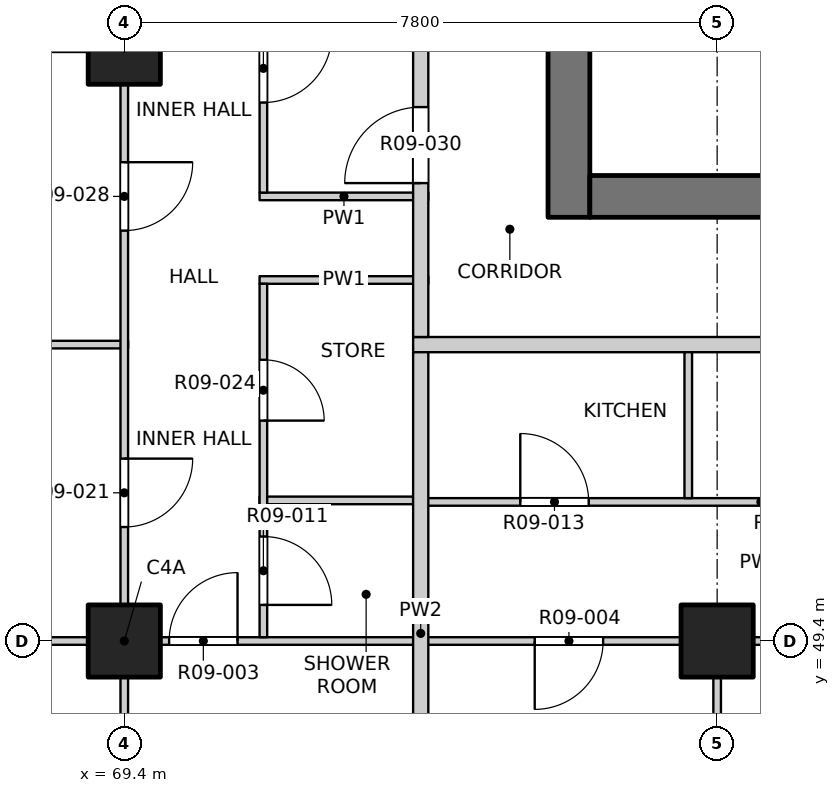
"""IFC4 building model, lengths in metres.
Left out: names, types, materials, properties, quantities, classifications, styles, units other than length and angle.
Written with IfcOpenShell. Run it as: python <this file> out.ifc"""

import sys

from ifc_helpers import new_model, si_unit, direction, frame, frame_2d, origin, origin_2d, place, context, subcontext, project, spatial, rectangle, extrude, element, fill, save


model = new_model("IFC4")
c1 = context("Model", 3, precision=1e-05, world=origin(), true_north=direction((0.0, 1.0)))
c2 = subcontext(c1, "Body", "Model", "MODEL_VIEW")
j1 = project(units=[si_unit("LENGTHUNIT", "METRE"), si_unit("PLANEANGLEUNIT", "RADIAN")], contexts=[c1])
p1 = place(None, origin())
s1 = spatial("IfcSite", under=j1, at=p1, CompositionType="ELEMENT")
p2 = place(p1, origin())
s2 = spatial("IfcBuilding", under=s1, at=p2, CompositionType="ELEMENT")
p3 = place(p2, frame((0.0, 0.0, 113.5)))
s3 = spatial("IfcBuildingStorey", under=s2, at=p3, CompositionType="ELEMENT", Elevation=113.5)
for number, where, z_axis, x_axis in (
    (1, (69.4, 49.4, -0.25), (0.0, 0.0, 1.0), (1.0, 0.0, 0.0)),
    (2, (69.4, 57.2, -0.25), (0.0, 0.0, 1.0), (1.0, 0.0, 0.0)),
    (3, (77.2, 49.4, -0.25), (0.0, 0.0, 1.0), (1.0, 0.0, 0.0)),
):
    element("IfcColumn", number, at=place(p3, frame(where, z_axis=z_axis, x_axis=x_axis)), inside=s3, PredefinedType="COLUMN", context=c2, shape_type="SweptSolid", body=[
        extrude(rectangle(XDim=0.95, YDim=0.95, at=origin_2d()), origin(), (0.0, 0.0, 1.0), 3.35),
    ])
p4 = place(p3, frame((75.25, 54.975, -0.25), z_axis=(0.0, 0.0, 1.0), x_axis=(0.0, 1.0, 0.0)))
e4 = element("IfcWall", 4, at=p4, inside=s3, PredefinedType="SOLIDWALL", context=c2, shape_type="SweptSolid", body=[
    extrude(rectangle(XDim=22.325, YDim=0.55, at=frame_2d((11.163, 0.0))), origin(), (0.0, 0.0, 1.0), 3.35),
])
p5 = place(p4, frame((7.475, 0.0, 0.25)))
e5 = element("IfcOpeningElement", 5, at=p5, cuts=e4, PredefinedType="OPENING", context=c2, shape_type="SweptSolid", body=[
    extrude(rectangle(XDim=0.9, YDim=2.1, at=frame_2d((0.45, 1.05))), frame((0.0, 0.285, 0.0), z_axis=(0.0, -1.0, 0.0), x_axis=(1.0, 0.0, 0.0)), (0.0, 0.0, 1.0), 0.57),
])
p6 = place(p4, frame((10.775, 0.0, 0.25)))
e6 = element("IfcOpeningElement", 6, at=p6, cuts=e4, PredefinedType="OPENING", context=c2, shape_type="SweptSolid", body=[
    extrude(rectangle(XDim=0.9, YDim=2.1, at=frame_2d((0.45, 1.05))), frame((0.0, 0.285, 0.0), z_axis=(0.0, -1.0, 0.0), x_axis=(1.0, 0.0, 0.0)), (0.0, 0.0, 1.0), 0.57),
])
p7 = place(p4, frame((15.275, 0.0, 0.25)))
e7 = element("IfcOpeningElement", 7, at=p7, cuts=e4, PredefinedType="OPENING", context=c2, shape_type="SweptSolid", body=[
    extrude(rectangle(XDim=0.9, YDim=2.1, at=frame_2d((0.45, 1.05))), frame((0.0, 0.285, 0.0), z_axis=(0.0, -1.0, 0.0), x_axis=(1.0, 0.0, 0.0)), (0.0, 0.0, 1.0), 0.57),
])
p8 = place(p4, frame((20.075, 0.0, 0.25)))
e8 = element("IfcOpeningElement", 8, at=p8, cuts=e4, PredefinedType="OPENING", context=c2, shape_type="SweptSolid", body=[
    extrude(rectangle(XDim=0.9, YDim=2.1, at=frame_2d((0.45, 1.05))), frame((0.0, 0.285, 0.0), z_axis=(0.0, -1.0, 0.0), x_axis=(1.0, 0.0, 0.0)), (0.0, 0.0, 1.0), 0.57),
])
p9 = place(p3, frame((75.525, 55.25, -0.25), z_axis=(0.0, 0.0, 1.0), x_axis=(1.0, 0.0, 0.0)))
e9 = element("IfcWall", 9, at=p9, inside=s3, PredefinedType="SOLIDWALL", context=c2, shape_type="SweptSolid", body=[
    extrude(rectangle(XDim=18.95, YDim=0.55, at=frame_2d((9.475, 0.0))), origin(), (0.0, 0.0, 1.0), 3.35),
])
p10 = place(p9, frame((8.725, 0.0, 0.25)))
e10 = element("IfcOpeningElement", 10, at=p10, cuts=e9, PredefinedType="OPENING", context=c2, shape_type="SweptSolid", body=[
    extrude(rectangle(XDim=1.5, YDim=2.1, at=frame_2d((0.75, 1.05))), frame((0.0, 0.285, 0.0), z_axis=(0.0, -1.0, 0.0), x_axis=(1.0, 0.0, 0.0)), (0.0, 0.0, 1.0), 0.57),
])
p11 = place(p3, frame((65.8, 49.4, 0.0), z_axis=(0.0, 0.0, 1.0), x_axis=(1.0, 0.0, 0.0)))
e11 = element("IfcWall", 11, at=p11, inside=s3, PredefinedType="PARTITIONING", context=c2, shape_type="SweptSolid", body=[
    extrude(rectangle(XDim=38.4, YDim=0.1, at=frame_2d((19.2, 0.0))), origin(), (0.0, 0.0, 1.0), 3.1),
])
p12 = place(p11, frame((4.19, 0.0, 0.0)))
e12 = element("IfcOpeningElement", 12, at=p12, cuts=e11, PredefinedType="OPENING", context=c2, shape_type="SweptSolid", body=[
    extrude(rectangle(XDim=0.9, YDim=2.1, at=frame_2d((0.45, 1.05))), frame((0.0, 0.06, 0.0), z_axis=(0.0, -1.0, 0.0), x_axis=(1.0, 0.0, 0.0)), (0.0, 0.0, 1.0), 0.12),
])
p13 = place(p11, frame((9.0, 0.0, 0.0)))
e13 = element("IfcOpeningElement", 13, at=p13, cuts=e11, PredefinedType="OPENING", context=c2, shape_type="SweptSolid", body=[
    extrude(rectangle(XDim=0.9, YDim=2.1, at=frame_2d((0.45, 1.05))), frame((0.0, 0.06, 0.0), z_axis=(0.0, -1.0, 0.0), x_axis=(1.0, 0.0, 0.0)), (0.0, 0.0, 1.0), 0.12),
])
p14 = place(p11, frame((12.9, 0.0, 0.0)))
e14 = element("IfcOpeningElement", 14, at=p14, cuts=e11, PredefinedType="OPENING", context=c2, shape_type="SweptSolid", body=[
    extrude(rectangle(XDim=0.9, YDim=2.1, at=frame_2d((0.45, 1.05))), frame((0.0, 0.06, 0.0), z_axis=(0.0, -1.0, 0.0), x_axis=(1.0, 0.0, 0.0)), (0.0, 0.0, 1.0), 0.12),
])
p15 = place(p11, frame((16.8, 0.0, 0.0)))
e15 = element("IfcOpeningElement", 15, at=p15, cuts=e11, PredefinedType="OPENING", context=c2, shape_type="SweptSolid", body=[
    extrude(rectangle(XDim=0.9, YDim=2.1, at=frame_2d((0.45, 1.05))), frame((0.0, 0.06, 0.0), z_axis=(0.0, -1.0, 0.0), x_axis=(1.0, 0.0, 0.0)), (0.0, 0.0, 1.0), 0.12),
])
p16 = place(p11, frame((20.7, 0.0, 0.0)))
e16 = element("IfcOpeningElement", 16, at=p16, cuts=e11, PredefinedType="OPENING", context=c2, shape_type="SweptSolid", body=[
    extrude(rectangle(XDim=0.9, YDim=2.1, at=frame_2d((0.45, 1.05))), frame((0.0, 0.06, 0.0), z_axis=(0.0, -1.0, 0.0), x_axis=(1.0, 0.0, 0.0)), (0.0, 0.0, 1.0), 0.12),
])
p17 = place(p11, frame((24.6, 0.0, 0.0)))
e17 = element("IfcOpeningElement", 17, at=p17, cuts=e11, PredefinedType="OPENING", context=c2, shape_type="SweptSolid", body=[
    extrude(rectangle(XDim=0.9, YDim=2.1, at=frame_2d((0.45, 1.05))), frame((0.0, 0.06, 0.0), z_axis=(0.0, -1.0, 0.0), x_axis=(1.0, 0.0, 0.0)), (0.0, 0.0, 1.0), 0.12),
])
p18 = place(p11, frame((28.5, 0.0, 0.0)))
e18 = element("IfcOpeningElement", 18, at=p18, cuts=e11, PredefinedType="OPENING", context=c2, shape_type="SweptSolid", body=[
    extrude(rectangle(XDim=0.9, YDim=2.1, at=frame_2d((0.45, 1.05))), frame((0.0, 0.06, 0.0), z_axis=(0.0, -1.0, 0.0), x_axis=(1.0, 0.0, 0.0)), (0.0, 0.0, 1.0), 0.12),
])
p19 = place(p11, frame((33.31, 0.0, 0.0)))
e19 = element("IfcOpeningElement", 19, at=p19, cuts=e11, PredefinedType="OPENING", context=c2, shape_type="SweptSolid", body=[
    extrude(rectangle(XDim=0.9, YDim=2.1, at=frame_2d((0.45, 1.05))), frame((0.0, 0.06, 0.0), z_axis=(0.0, -1.0, 0.0), x_axis=(1.0, 0.0, 0.0)), (0.0, 0.0, 1.0), 0.12),
])
p20 = place(p3, frame((73.2, 51.23, 0.0), z_axis=(0.0, 0.0, 1.0), x_axis=(1.0, 0.0, 0.0)))
e20 = element("IfcWall", 20, at=p20, inside=s3, PredefinedType="PARTITIONING", context=c2, shape_type="SweptSolid", body=[
    extrude(rectangle(XDim=9.15, YDim=0.1, at=frame_2d((4.575, 0.0))), origin(), (0.0, 0.0, 1.0), 3.1),
])
p21 = place(p20, frame((1.41, 0.0, 0.0)))
e21 = element("IfcOpeningElement", 21, at=p21, cuts=e20, PredefinedType="OPENING", context=c2, shape_type="SweptSolid", body=[
    extrude(rectangle(XDim=0.9, YDim=2.1, at=frame_2d((0.45, 1.05))), frame((0.0, 0.06, 0.0), z_axis=(0.0, -1.0, 0.0), x_axis=(1.0, 0.0, 0.0)), (0.0, 0.0, 1.0), 0.12),
])
p22 = place(p20, frame((4.76, 0.0, 0.0)))
e22 = element("IfcOpeningElement", 22, at=p22, cuts=e20, PredefinedType="OPENING", context=c2, shape_type="SweptSolid", body=[
    extrude(rectangle(XDim=0.8, YDim=2.1, at=frame_2d((0.4, 1.05))), frame((0.0, 0.06, 0.0), z_axis=(0.0, -1.0, 0.0), x_axis=(1.0, 0.0, 0.0)), (0.0, 0.0, 1.0), 0.12),
])
p23 = place(p20, frame((7.45, 0.0, 0.0)))
e23 = element("IfcOpeningElement", 23, at=p23, cuts=e20, PredefinedType="OPENING", context=c2, shape_type="SweptSolid", body=[
    extrude(rectangle(XDim=0.9, YDim=2.1, at=frame_2d((0.45, 1.05))), frame((0.0, 0.06, 0.0), z_axis=(0.0, -1.0, 0.0), x_axis=(1.0, 0.0, 0.0)), (0.0, 0.0, 1.0), 0.12),
])
p24 = place(p3, frame((71.18, 51.25, 0.0), z_axis=(0.0, 0.0, 1.0), x_axis=(1.0, 0.0, 0.0)))
e24 = element("IfcWall", 24, at=p24, inside=s3, PredefinedType="PARTITIONING", context=c2, shape_type="SweptSolid", body=[
    extrude(rectangle(XDim=2.02, YDim=0.1, at=frame_2d((1.01, 0.0))), origin(), (0.0, 0.0, 1.0), 3.1),
])
p25 = place(p3, frame((65.8, 53.3, 0.0), z_axis=(0.0, 0.0, 1.0), x_axis=(1.0, 0.0, 0.0)))
e25 = element("IfcWall", 25, at=p25, inside=s3, PredefinedType="PARTITIONING", context=c2, shape_type="SweptSolid", body=[
    extrude(rectangle(XDim=3.65, YDim=0.1, at=frame_2d((1.825, 0.0))), origin(), (0.0, 0.0, 1.0), 3.1),
])
p26 = place(p3, frame((73.2, 53.3, 0.0), z_axis=(0.0, 0.0, 1.0), x_axis=(1.0, 0.0, 0.0)))
e26 = element("IfcWall", 26, at=p26, inside=s3, PredefinedType="PARTITIONING", context=c2, shape_type="SweptSolid", body=[
    extrude(rectangle(XDim=23.6, YDim=0.2, at=frame_2d((11.8, 0.0))), origin(), (0.0, 0.0, 1.0), 3.1),
])
p27 = place(p26, frame((10.375, 0.0, 0.0)))
e27 = element("IfcOpeningElement", 27, at=p27, cuts=e26, PredefinedType="OPENING", context=c2, shape_type="SweptSolid", body=[
    extrude(rectangle(XDim=1.0, YDim=2.1, at=frame_2d((0.5, 1.05))), frame((0.0, 0.11, 0.0), z_axis=(0.0, -1.0, 0.0), x_axis=(1.0, 0.0, 0.0)), (0.0, 0.0, 1.0), 0.22),
])
p28 = place(p26, frame((22.075, 0.0, 0.0)))
e28 = element("IfcOpeningElement", 28, at=p28, cuts=e26, PredefinedType="OPENING", context=c2, shape_type="SweptSolid", body=[
    extrude(rectangle(XDim=1.0, YDim=2.1, at=frame_2d((0.5, 1.05))), frame((0.0, 0.11, 0.0), z_axis=(0.0, -1.0, 0.0), x_axis=(1.0, 0.0, 0.0)), (0.0, 0.0, 1.0), 0.22),
])
for number, where, z_axis, x_axis in (
    (29, (71.18, 54.15, 0.0), (0.0, 0.0, 1.0), (1.0, 0.0, 0.0)),
    (30, (71.18, 55.25, 0.0), (0.0, 0.0, 1.0), (1.0, 0.0, 0.0)),
):
    element("IfcWall", number, at=place(p3, frame(where, z_axis=z_axis, x_axis=x_axis)), inside=s3, PredefinedType="PARTITIONING", context=c2, shape_type="SweptSolid", body=[
        extrude(rectangle(XDim=2.22, YDim=0.1, at=frame_2d((1.11, 0.0))), origin(), (0.0, 0.0, 1.0), 3.1),
    ])
p29 = place(p3, frame((69.4, 45.8, 0.0), z_axis=(0.0, 0.0, 1.0), x_axis=(0.0, 1.0, 0.0)))
e31 = element("IfcWall", 31, at=p29, inside=s3, PredefinedType="PARTITIONING", context=c2, shape_type="SweptSolid", body=[
    extrude(rectangle(XDim=38.4, YDim=0.1, at=frame_2d((19.2, 0.0))), origin(), (0.0, 0.0, 1.0), 3.1),
])
p30 = place(p29, frame((1.05, 0.0, 0.0)))
e32 = element("IfcOpeningElement", 32, at=p30, cuts=e31, PredefinedType="OPENING", context=c2, shape_type="SweptSolid", body=[
    extrude(rectangle(XDim=1.2, YDim=2.1, at=frame_2d((0.6, 1.05))), frame((0.0, 0.06, 0.0), z_axis=(0.0, -1.0, 0.0), x_axis=(1.0, 0.0, 0.0)), (0.0, 0.0, 1.0), 0.12),
])
p31 = place(p29, frame((5.1, 0.0, 0.0)))
e33 = element("IfcOpeningElement", 33, at=p31, cuts=e31, PredefinedType="OPENING", context=c2, shape_type="SweptSolid", body=[
    extrude(rectangle(XDim=0.9, YDim=2.1, at=frame_2d((0.45, 1.05))), frame((0.0, 0.06, 0.0), z_axis=(0.0, -1.0, 0.0), x_axis=(1.0, 0.0, 0.0)), (0.0, 0.0, 1.0), 0.12),
])
p32 = place(p29, frame((9.0, 0.0, 0.0)))
e34 = element("IfcOpeningElement", 34, at=p32, cuts=e31, PredefinedType="OPENING", context=c2, shape_type="SweptSolid", body=[
    extrude(rectangle(XDim=0.9, YDim=2.1, at=frame_2d((0.45, 1.05))), frame((0.0, 0.06, 0.0), z_axis=(0.0, -1.0, 0.0), x_axis=(1.0, 0.0, 0.0)), (0.0, 0.0, 1.0), 0.12),
])
p33 = place(p29, frame((12.9, 0.0, 0.0)))
e35 = element("IfcOpeningElement", 35, at=p33, cuts=e31, PredefinedType="OPENING", context=c2, shape_type="SweptSolid", body=[
    extrude(rectangle(XDim=0.9, YDim=2.1, at=frame_2d((0.45, 1.05))), frame((0.0, 0.06, 0.0), z_axis=(0.0, -1.0, 0.0), x_axis=(1.0, 0.0, 0.0)), (0.0, 0.0, 1.0), 0.12),
])
p34 = place(p29, frame((16.8, 0.0, 0.0)))
e36 = element("IfcOpeningElement", 36, at=p34, cuts=e31, PredefinedType="OPENING", context=c2, shape_type="SweptSolid", body=[
    extrude(rectangle(XDim=0.9, YDim=2.1, at=frame_2d((0.45, 1.05))), frame((0.0, 0.06, 0.0), z_axis=(0.0, -1.0, 0.0), x_axis=(1.0, 0.0, 0.0)), (0.0, 0.0, 1.0), 0.12),
])
p35 = place(p29, frame((20.7, 0.0, 0.0)))
e37 = element("IfcOpeningElement", 37, at=p35, cuts=e31, PredefinedType="OPENING", context=c2, shape_type="SweptSolid", body=[
    extrude(rectangle(XDim=0.9, YDim=2.1, at=frame_2d((0.45, 1.05))), frame((0.0, 0.06, 0.0), z_axis=(0.0, -1.0, 0.0), x_axis=(1.0, 0.0, 0.0)), (0.0, 0.0, 1.0), 0.12),
])
p36 = place(p29, frame((24.6, 0.0, 0.0)))
e38 = element("IfcOpeningElement", 38, at=p36, cuts=e31, PredefinedType="OPENING", context=c2, shape_type="SweptSolid", body=[
    extrude(rectangle(XDim=0.9, YDim=2.1, at=frame_2d((0.45, 1.05))), frame((0.0, 0.06, 0.0), z_axis=(0.0, -1.0, 0.0), x_axis=(1.0, 0.0, 0.0)), (0.0, 0.0, 1.0), 0.12),
])
p37 = place(p29, frame((28.5, 0.0, 0.0)))
e39 = element("IfcOpeningElement", 39, at=p37, cuts=e31, PredefinedType="OPENING", context=c2, shape_type="SweptSolid", body=[
    extrude(rectangle(XDim=0.9, YDim=2.1, at=frame_2d((0.45, 1.05))), frame((0.0, 0.06, 0.0), z_axis=(0.0, -1.0, 0.0), x_axis=(1.0, 0.0, 0.0)), (0.0, 0.0, 1.0), 0.12),
])
p38 = place(p29, frame((32.4, 0.0, 0.0)))
e40 = element("IfcOpeningElement", 40, at=p38, cuts=e31, PredefinedType="OPENING", context=c2, shape_type="SweptSolid", body=[
    extrude(rectangle(XDim=0.9, YDim=2.1, at=frame_2d((0.45, 1.05))), frame((0.0, 0.06, 0.0), z_axis=(0.0, -1.0, 0.0), x_axis=(1.0, 0.0, 0.0)), (0.0, 0.0, 1.0), 0.12),
])
p39 = place(p29, frame((36.15, 0.0, 0.0)))
e41 = element("IfcOpeningElement", 41, at=p39, cuts=e31, PredefinedType="OPENING", context=c2, shape_type="SweptSolid", body=[
    extrude(rectangle(XDim=1.2, YDim=2.1, at=frame_2d((0.6, 1.05))), frame((0.0, 0.06, 0.0), z_axis=(0.0, -1.0, 0.0), x_axis=(1.0, 0.0, 0.0)), (0.0, 0.0, 1.0), 0.12),
])
p40 = place(p3, frame((71.23, 49.45, 0.0), z_axis=(0.0, 0.0, 1.0), x_axis=(0.0, 1.0, 0.0)))
e42 = element("IfcWall", 42, at=p40, inside=s3, PredefinedType="PARTITIONING", context=c2, shape_type="SweptSolid", body=[
    extrude(rectangle(XDim=4.65, YDim=0.1, at=frame_2d((2.325, 0.0))), origin(), (0.0, 0.0, 1.0), 3.1),
])
p41 = place(p40, frame((0.425, 0.0, 0.0)))
e43 = element("IfcOpeningElement", 43, at=p41, cuts=e42, PredefinedType="OPENING", context=c2, shape_type="SweptSolid", body=[
    extrude(rectangle(XDim=0.9, YDim=2.1, at=frame_2d((0.45, 1.05))), frame((0.0, 0.06, 0.0), z_axis=(0.0, -1.0, 0.0), x_axis=(1.0, 0.0, 0.0)), (0.0, 0.0, 1.0), 0.12),
])
p42 = place(p40, frame((2.85, 0.0, 0.0)))
e44 = element("IfcOpeningElement", 44, at=p42, cuts=e42, PredefinedType="OPENING", context=c2, shape_type="SweptSolid", body=[
    extrude(rectangle(XDim=0.8, YDim=2.1, at=frame_2d((0.4, 1.05))), frame((0.0, 0.06, 0.0), z_axis=(0.0, -1.0, 0.0), x_axis=(1.0, 0.0, 0.0)), (0.0, 0.0, 1.0), 0.12),
])
p43 = place(p3, frame((71.23, 55.3, 0.0), z_axis=(0.0, 0.0, 1.0), x_axis=(0.0, 1.0, 0.0)))
e45 = element("IfcWall", 45, at=p43, inside=s3, PredefinedType="PARTITIONING", context=c2, shape_type="SweptSolid", body=[
    extrude(rectangle(XDim=11.65, YDim=0.1, at=frame_2d((5.825, 0.0))), origin(), (0.0, 0.0, 1.0), 3.1),
])
p44 = place(p43, frame((1.185, 0.0, 0.0)))
e46 = element("IfcOpeningElement", 46, at=p44, cuts=e45, PredefinedType="OPENING", context=c2, shape_type="SweptSolid", body=[
    extrude(rectangle(XDim=0.9, YDim=2.1, at=frame_2d((0.45, 1.05))), frame((0.0, 0.06, 0.0), z_axis=(0.0, -1.0, 0.0), x_axis=(1.0, 0.0, 0.0)), (0.0, 0.0, 1.0), 0.12),
])
p45 = place(p43, frame((4.11, 0.0, 0.0)))
e47 = element("IfcOpeningElement", 47, at=p45, cuts=e45, PredefinedType="OPENING", context=c2, shape_type="SweptSolid", body=[
    extrude(rectangle(XDim=0.9, YDim=2.1, at=frame_2d((0.45, 1.05))), frame((0.0, 0.06, 0.0), z_axis=(0.0, -1.0, 0.0), x_axis=(1.0, 0.0, 0.0)), (0.0, 0.0, 1.0), 0.12),
])
p46 = place(p43, frame((7.1, 0.0, 0.0)))
e48 = element("IfcOpeningElement", 48, at=p46, cuts=e45, PredefinedType="OPENING", context=c2, shape_type="SweptSolid", body=[
    extrude(rectangle(XDim=0.9, YDim=2.1, at=frame_2d((0.45, 1.05))), frame((0.0, 0.06, 0.0), z_axis=(0.0, -1.0, 0.0), x_axis=(1.0, 0.0, 0.0)), (0.0, 0.0, 1.0), 0.12),
])
p47 = place(p43, frame((10.05, 0.0, 0.0)))
e49 = element("IfcOpeningElement", 49, at=p47, cuts=e45, PredefinedType="OPENING", context=c2, shape_type="SweptSolid", body=[
    extrude(rectangle(XDim=0.9, YDim=2.1, at=frame_2d((0.45, 1.05))), frame((0.0, 0.06, 0.0), z_axis=(0.0, -1.0, 0.0), x_axis=(1.0, 0.0, 0.0)), (0.0, 0.0, 1.0), 0.12),
])
p48 = place(p3, frame((73.3, 45.8, 0.0), z_axis=(0.0, 0.0, 1.0), x_axis=(0.0, 1.0, 0.0)))
e50 = element("IfcWall", 50, at=p48, inside=s3, PredefinedType="PARTITIONING", context=c2, shape_type="SweptSolid", body=[
    extrude(rectangle(XDim=7.4, YDim=0.2, at=frame_2d((3.7, 0.0))), origin(), (0.0, 0.0, 1.0), 3.1),
])
p49 = place(p3, frame((73.3, 53.4, 0.0), z_axis=(0.0, 0.0, 1.0), x_axis=(0.0, 1.0, 0.0)))
e51 = element("IfcWall", 51, at=p49, inside=s3, PredefinedType="PARTITIONING", context=c2, shape_type="SweptSolid", body=[
    extrude(rectangle(XDim=30.8, YDim=0.2, at=frame_2d((15.4, 0.0))), origin(), (0.0, 0.0, 1.0), 3.1),
])
p50 = place(p49, frame((2.025, 0.0, 0.0)))
e52 = element("IfcOpeningElement", 52, at=p50, cuts=e51, PredefinedType="OPENING", context=c2, shape_type="SweptSolid", body=[
    extrude(rectangle(XDim=1.0, YDim=2.1, at=frame_2d((0.5, 1.05))), frame((0.0, 0.11, 0.0), z_axis=(0.0, -1.0, 0.0), x_axis=(1.0, 0.0, 0.0)), (0.0, 0.0, 1.0), 0.22),
])
p51 = place(p49, frame((14.875, 0.0, 0.0)))
e53 = element("IfcOpeningElement", 53, at=p51, cuts=e51, PredefinedType="OPENING", context=c2, shape_type="SweptSolid", body=[
    extrude(rectangle(XDim=1.0, YDim=2.1, at=frame_2d((0.5, 1.05))), frame((0.0, 0.11, 0.0), z_axis=(0.0, -1.0, 0.0), x_axis=(1.0, 0.0, 0.0)), (0.0, 0.0, 1.0), 0.22),
])
p52 = place(p49, frame((25.225, 0.0, 0.0)))
e54 = element("IfcOpeningElement", 54, at=p52, cuts=e51, PredefinedType="OPENING", context=c2, shape_type="SweptSolid", body=[
    extrude(rectangle(XDim=1.0, YDim=2.1, at=frame_2d((0.5, 1.05))), frame((0.0, 0.11, 0.0), z_axis=(0.0, -1.0, 0.0), x_axis=(1.0, 0.0, 0.0)), (0.0, 0.0, 1.0), 0.22),
])
p53 = place(p3, frame((76.82, 51.28, 0.0), z_axis=(0.0, 0.0, 1.0), x_axis=(0.0, 1.0, 0.0)))
e55 = element("IfcWall", 55, at=p53, inside=s3, PredefinedType="PARTITIONING", context=c2, shape_type="SweptSolid", body=[
    extrude(rectangle(XDim=1.92, YDim=0.1, at=frame_2d((0.96, 0.0))), origin(), (0.0, 0.0, 1.0), 3.1),
])
p54 = place(p3, frame((77.2, 45.8, 0.0), z_axis=(0.0, 0.0, 1.0), x_axis=(0.0, 1.0, 0.0)))
e56 = element("IfcWall", 56, at=p54, inside=s3, PredefinedType="PARTITIONING", context=c2, shape_type="SweptSolid", body=[
    extrude(rectangle(XDim=3.55, YDim=0.1, at=frame_2d((1.775, 0.0))), origin(), (0.0, 0.0, 1.0), 3.1),
])
p55 = place(p12, origin())
e57 = element("IfcDoor", 57, at=p55, inside=s3, OperationType="SINGLE_SWING_RIGHT", PredefinedType="DOOR", context=c2, shape_type="SweptSolid", body=[
    extrude(rectangle(XDim=0.9, YDim=2.1, at=frame_2d((0.45, 1.05))), frame((0.0, 0.025, 0.0), z_axis=(0.0, -1.0, 0.0), x_axis=(1.0, 0.0, 0.0)), (0.0, 0.0, 1.0), 0.05),
])
fill(e12, e57)
p56 = place(p13, origin())
e58 = element("IfcDoor", 58, at=p56, inside=s3, OperationType="SINGLE_SWING_RIGHT", PredefinedType="DOOR", context=c2, shape_type="SweptSolid", body=[
    extrude(rectangle(XDim=0.9, YDim=2.1, at=frame_2d((0.45, 1.05))), frame((0.0, 0.025, 0.0), z_axis=(0.0, -1.0, 0.0), x_axis=(1.0, 0.0, 0.0)), (0.0, 0.0, 1.0), 0.05),
])
fill(e13, e58)
p57 = place(p41, origin())
e59 = element("IfcDoor", 59, at=p57, inside=s3, OperationType="SINGLE_SWING_RIGHT", PredefinedType="DOOR", context=c2, shape_type="SweptSolid", body=[
    extrude(rectangle(XDim=0.9, YDim=2.1, at=frame_2d((0.45, 1.05))), frame((0.0, 0.025, 0.0), z_axis=(0.0, -1.0, 0.0), x_axis=(1.0, 0.0, 0.0)), (0.0, 0.0, 1.0), 0.05),
])
fill(e43, e59)
p58 = place(p21, origin())
e60 = element("IfcDoor", 60, at=p58, inside=s3, OperationType="SINGLE_SWING_LEFT", PredefinedType="DOOR", context=c2, shape_type="SweptSolid", body=[
    extrude(rectangle(XDim=0.9, YDim=2.1, at=frame_2d((0.45, 1.05))), frame((0.0, 0.025, 0.0), z_axis=(0.0, -1.0, 0.0), x_axis=(1.0, 0.0, 0.0)), (0.0, 0.0, 1.0), 0.05),
])
fill(e21, e60)
p59 = place(p31, origin())
e61 = element("IfcDoor", 61, at=p59, inside=s3, OperationType="SINGLE_SWING_LEFT", PredefinedType="DOOR", context=c2, shape_type="SweptSolid", body=[
    extrude(rectangle(XDim=0.9, YDim=2.1, at=frame_2d((0.45, 1.05))), frame((0.0, 0.025, 0.0), z_axis=(0.0, -1.0, 0.0), x_axis=(1.0, 0.0, 0.0)), (0.0, 0.0, 1.0), 0.05),
])
fill(e33, e61)
p60 = place(p42, origin())
e62 = element("IfcDoor", 62, at=p60, inside=s3, OperationType="SINGLE_SWING_RIGHT", PredefinedType="DOOR", context=c2, shape_type="SweptSolid", body=[
    extrude(rectangle(XDim=0.8, YDim=2.1, at=frame_2d((0.4, 1.05))), frame((0.0, 0.025, 0.0), z_axis=(0.0, -1.0, 0.0), x_axis=(1.0, 0.0, 0.0)), (0.0, 0.0, 1.0), 0.05),
])
fill(e44, e62)
p61 = place(p32, origin())
e63 = element("IfcDoor", 63, at=p61, inside=s3, OperationType="SINGLE_SWING_LEFT", PredefinedType="DOOR", context=c2, shape_type="SweptSolid", body=[
    extrude(rectangle(XDim=0.9, YDim=2.1, at=frame_2d((0.45, 1.05))), frame((0.0, 0.025, 0.0), z_axis=(0.0, -1.0, 0.0), x_axis=(1.0, 0.0, 0.0)), (0.0, 0.0, 1.0), 0.05),
])
fill(e34, e63)
p62 = place(p50, origin())
e64 = element("IfcDoor", 64, at=p62, inside=s3, OperationType="SINGLE_SWING_RIGHT", PredefinedType="DOOR", context=c2, shape_type="SweptSolid", body=[
    extrude(rectangle(XDim=1.0, YDim=2.1, at=frame_2d((0.5, 1.05))), frame((0.0, 0.025, 0.0), z_axis=(0.0, -1.0, 0.0), x_axis=(1.0, 0.0, 0.0)), (0.0, 0.0, 1.0), 0.05),
])
fill(e52, e64)
p63 = place(p44, origin())
e65 = element("IfcDoor", 65, at=p63, inside=s3, OperationType="SINGLE_SWING_LEFT", PredefinedType="DOOR", context=c2, shape_type="SweptSolid", body=[
    extrude(rectangle(XDim=0.9, YDim=2.1, at=frame_2d((0.45, 1.05))), frame((0.0, 0.025, 0.0), z_axis=(0.0, -1.0, 0.0), x_axis=(1.0, 0.0, 0.0)), (0.0, 0.0, 1.0), 0.05),
])
fill(e46, e65)
save(model, sys.argv[1])
